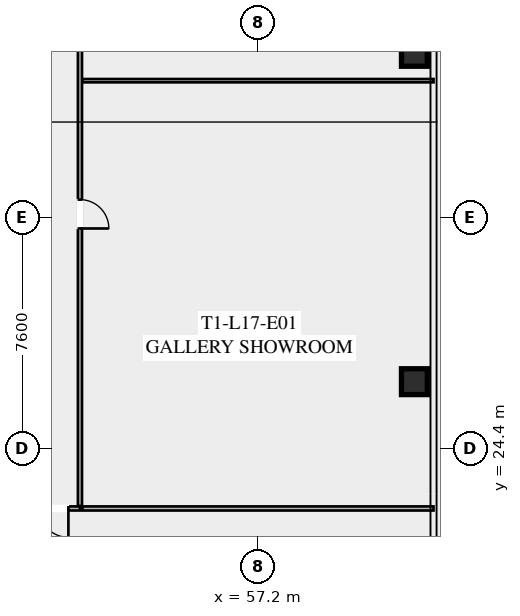
"""IFC4 building model, lengths in metres.
Left out: names, types, materials, properties, quantities, classifications, styles, units other than length and angle.
Written with IfcOpenShell. Run it as: python <this file> out.ifc"""

import sys

from ifc_helpers import new_model, si_unit, direction, frame, frame_2d, origin, origin_2d, place, context, subcontext, project, spatial, rectangle, hollow_rectangle, extrude, element, fill, save


model = new_model("IFC4")
c1 = context("Model", 3, precision=1e-05, world=origin(), true_north=direction((0.0, 1.0)))
c2 = subcontext(c1, "Body", "Model", "MODEL_VIEW")
j1 = project(units=[si_unit("LENGTHUNIT", "METRE"), si_unit("PLANEANGLEUNIT", "RADIAN")], contexts=[c1])
p1 = place(None, origin())
s1 = spatial("IfcSite", under=j1, at=p1, CompositionType="ELEMENT")
p2 = place(p1, origin())
s2 = spatial("IfcBuilding", under=s1, at=p2, CompositionType="ELEMENT")
p3 = place(p2, frame((0.0, 0.0, 67.2)))
s3 = spatial("IfcBuildingStorey", under=s2, at=p3, CompositionType="ELEMENT", Elevation=67.2)
for number, where, z_axis, x_axis in (
    (1, (62.35, 26.6, -0.195), (0.0, 0.0, 1.0), (1.0, 0.0, 0.0)),
    (2, (62.35, 37.4, -0.195), (0.0, 0.0, 1.0), (1.0, 0.0, 0.0)),
):
    element("IfcColumn", number, at=place(p3, frame(where, z_axis=z_axis, x_axis=x_axis)), inside=s3, PredefinedType="COLUMN", context=c2, shape_type="SweptSolid", body=[
        extrude(hollow_rectangle(XDim=0.85, YDim=0.85, WallThickness=0.035, at=origin_2d()), origin(), (0.0, 0.0, 1.0), 3.545),
    ])
p4 = place(p3, frame((51.35, 22.43, 0.0), z_axis=(0.0, 0.0, 1.0), x_axis=(-1.0, 0.0, 0.0)))
e3 = element("IfcWall", 3, at=p4, inside=s3, PredefinedType="PARTITIONING", context=c2, shape_type="SweptSolid", body=[
    extrude(rectangle(XDim=27.3, YDim=0.135, at=frame_2d((13.65, 0.0))), origin(), (0.0, 0.0, 1.0), 2.703),
])
p5 = place(p4, frame((25.97, 0.0, 0.0)))
e4 = element("IfcOpeningElement", 4, at=p5, cuts=e3, PredefinedType="OPENING", context=c2, shape_type="SweptSolid", body=[
    extrude(rectangle(XDim=0.95, YDim=2.05, at=frame_2d((0.475, 1.025))), frame((0.0, 0.077, 0.0), z_axis=(0.0, -1.0, 0.0), x_axis=(1.0, 0.0, 0.0)), (0.0, 0.0, 1.0), 0.155),
])
p6 = place(p4, frame((12.698, 0.0, 0.0)))
e5 = element("IfcOpeningElement", 5, at=p6, cuts=e3, PredefinedType="OPENING", context=c2, shape_type="SweptSolid", body=[
    extrude(rectangle(XDim=0.95, YDim=2.05, at=frame_2d((0.475, 1.025))), frame((0.0, 0.077, 0.0), z_axis=(0.0, -1.0, 0.0), x_axis=(1.0, 0.0, 0.0)), (0.0, 0.0, 1.0), 0.155),
])
p7 = place(p4, frame((8.639, 0.0, 0.0)))
e6 = element("IfcOpeningElement", 6, at=p7, cuts=e3, PredefinedType="OPENING", context=c2, shape_type="SweptSolid", body=[
    extrude(rectangle(XDim=0.95, YDim=2.05, at=frame_2d((0.475, 1.025))), frame((0.0, 0.077, 0.0), z_axis=(0.0, -1.0, 0.0), x_axis=(1.0, 0.0, 0.0)), (0.0, 0.0, 1.0), 0.155),
])
p8 = place(p4, frame((0.38, 0.0, 0.0)))
e7 = element("IfcOpeningElement", 7, at=p8, cuts=e3, PredefinedType="OPENING", context=c2, shape_type="SweptSolid", body=[
    extrude(rectangle(XDim=0.95, YDim=2.05, at=frame_2d((0.475, 1.025))), frame((0.0, 0.077, 0.0), z_axis=(0.0, -1.0, 0.0), x_axis=(1.0, 0.0, 0.0)), (0.0, 0.0, 1.0), 0.155),
])
p9 = place(p3, frame((51.35, 42.77, 0.0), z_axis=(0.0, 0.0, 1.0), x_axis=(0.0, -1.0, 0.0)))
e8 = element("IfcWall", 8, at=p9, inside=s3, PredefinedType="PARTITIONING", context=c2, shape_type="SweptSolid", body=[
    extrude(rectangle(XDim=20.26, YDim=0.135, at=frame_2d((10.13, 0.0))), origin(), (0.0, 0.0, 1.0), 2.703),
])
p10 = place(p9, frame((10.181, 0.0, 0.0)))
e9 = element("IfcOpeningElement", 9, at=p10, cuts=e8, PredefinedType="OPENING", context=c2, shape_type="SweptSolid", body=[
    extrude(rectangle(XDim=0.95, YDim=2.05, at=frame_2d((0.475, 1.025))), frame((0.0, 0.077, 0.0), z_axis=(0.0, -1.0, 0.0), x_axis=(1.0, 0.0, 0.0)), (0.0, 0.0, 1.0), 0.155),
])
p11 = place(p9, frame((0.3, 0.0, 0.0)))
e10 = element("IfcOpeningElement", 10, at=p11, cuts=e8, PredefinedType="OPENING", context=c2, shape_type="SweptSolid", body=[
    extrude(rectangle(XDim=0.95, YDim=2.05, at=frame_2d((0.475, 1.025))), frame((0.0, 0.077, 0.0), z_axis=(0.0, -1.0, 0.0), x_axis=(1.0, 0.0, 0.0)), (0.0, 0.0, 1.0), 0.155),
])
p12 = place(p3, frame((51.43, 22.43, 0.0), z_axis=(0.0, 0.0, 1.0), x_axis=(1.0, 0.0, 0.0)))
e11 = element("IfcWall", 11, at=p12, inside=s3, PredefinedType="PARTITIONING", context=c2, shape_type="SweptSolid", body=[
    extrude(rectangle(XDim=11.55, YDim=0.135, at=frame_2d((5.775, 0.0))), origin(), (0.0, 0.0, 1.0), 2.703),
])
p13 = place(p3, frame((51.43, 36.5, 0.0), z_axis=(0.0, 0.0, 1.0), x_axis=(1.0, 0.0, 0.0)))
e12 = element("IfcWall", 12, at=p13, inside=s3, PredefinedType="PARTITIONING", context=c2, shape_type="SweptSolid", body=[
    extrude(rectangle(XDim=11.55, YDim=0.11, at=frame_2d((5.775, 0.0))), origin(), (0.0, 0.0, 1.0), 2.703),
])
p14 = place(p8, origin())
e13 = element("IfcDoor", 13, at=p14, inside=s3, OperationType="SINGLE_SWING_LEFT", PredefinedType="DOOR", context=c2, shape_type="SweptSolid", body=[
    extrude(rectangle(XDim=0.95, YDim=2.05, at=frame_2d((0.475, 1.025))), frame((0.0, 0.025, 0.0), z_axis=(0.0, -1.0, 0.0), x_axis=(1.0, 0.0, 0.0)), (0.0, 0.0, 1.0), 0.05),
])
fill(e7, e13)
p15 = place(p10, origin())
e14 = element("IfcDoor", 14, at=p15, inside=s3, OperationType="SINGLE_SWING_RIGHT", PredefinedType="DOOR", context=c2, shape_type="SweptSolid", body=[
    extrude(rectangle(XDim=0.95, YDim=2.05, at=frame_2d((0.475, 1.025))), frame((0.0, 0.025, 0.0), z_axis=(0.0, -1.0, 0.0), x_axis=(1.0, 0.0, 0.0)), (0.0, 0.0, 1.0), 0.05),
])
fill(e9, e14)
save(model, sys.argv[1])
